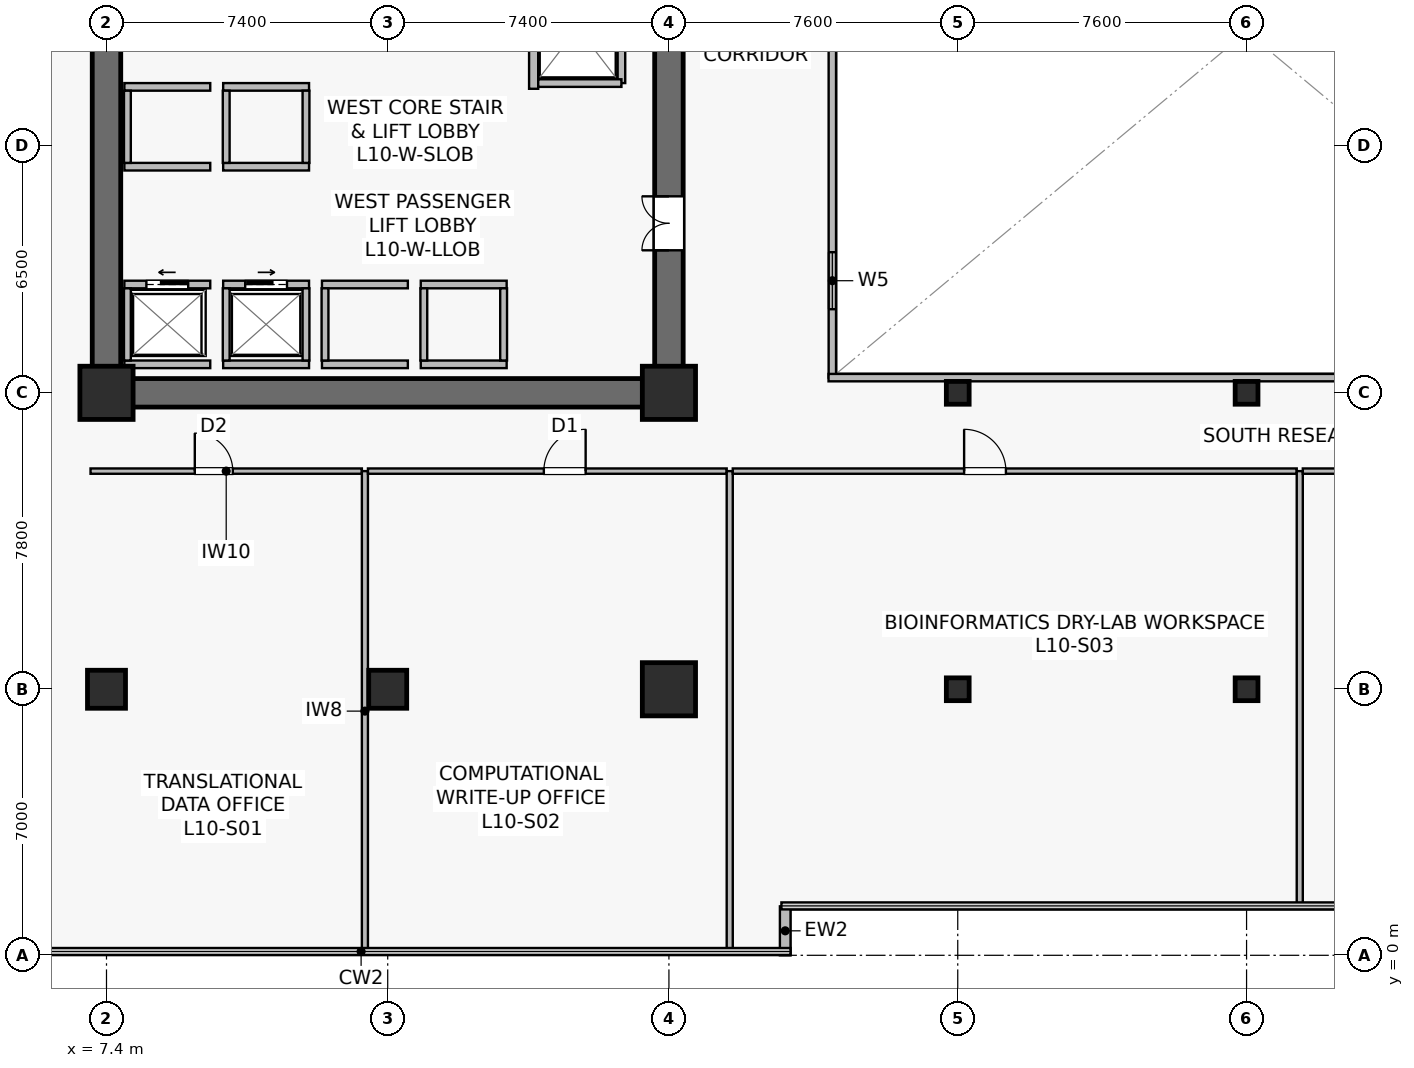
"""IFC4 building model, lengths in metres.
Left out: names, types, materials, properties, quantities, classifications, styles, units other than length and angle.
Written with IfcOpenShell. Run it as: python <this file> out.ifc"""

import sys

from ifc_helpers import new_model, si_unit, direction, frame, frame_2d, origin, origin_2d, place, context, subcontext, project, spatial, rectangle, hollow_rectangle, extrude, source, transform, mapped, element, fill, save


model = new_model("IFC4")
c1 = context("Model", 3, precision=1e-05, world=origin(), true_north=direction((0.0, 1.0)))
c2 = subcontext(c1, "Body", "Model", "MODEL_VIEW")
j1 = project(units=[si_unit("LENGTHUNIT", "METRE"), si_unit("PLANEANGLEUNIT", "RADIAN")], contexts=[c1])
p1 = place(None, origin())
s1 = spatial("IfcSite", under=j1, at=p1, CompositionType="ELEMENT")
p2 = place(p1, origin())
s2 = spatial("IfcBuilding", under=s1, at=p2, CompositionType="ELEMENT")
p3 = place(p2, frame((0.0, 0.0, 41.6)))
s3 = spatial("IfcBuildingStorey", under=s2, at=p3, CompositionType="ELEMENT", Elevation=41.6)
p4 = place(p3, frame((7.025, 14.8, 0.0), z_axis=(0.0, 0.0, 1.0), x_axis=(1.0, 0.0, 0.0)))
e1 = element("IfcWall", 1, at=p4, inside=s3, PredefinedType="SHEAR", context=c2, shape_type="SweptSolid", body=[
    extrude(rectangle(XDim=15.55, YDim=0.75, at=frame_2d((7.775, 0.0))), origin(), (0.0, 0.0, 1.0), 3.78),
])
p5 = place(p3, frame((7.4, 15.175, 0.0), z_axis=(0.0, 0.0, 1.0), x_axis=(0.0, 1.0, 0.0)))
e2 = element("IfcWall", 2, at=p5, inside=s3, PredefinedType="SHEAR", context=c2, shape_type="SweptSolid", body=[
    extrude(rectangle(XDim=18.25, YDim=0.75, at=frame_2d((9.125, 0.0))), origin(), (0.0, 0.0, 1.0), 3.78),
])
p6 = place(p3, frame((22.2, 15.175, 0.0), z_axis=(0.0, 0.0, 1.0), x_axis=(0.0, 1.0, 0.0)))
e3 = element("IfcWall", 3, at=p6, inside=s3, PredefinedType="SHEAR", context=c2, shape_type="SweptSolid", body=[
    extrude(rectangle(XDim=18.25, YDim=0.75, at=frame_2d((9.125, 0.0))), origin(), (0.0, 0.0, 1.0), 3.78),
])
p7 = place(p6, frame((3.375, 0.0, 0.0)))
e4 = element("IfcOpeningElement", 4, at=p7, cuts=e3, PredefinedType="OPENING", context=c2, shape_type="SweptSolid", body=[
    extrude(rectangle(XDim=1.42, YDim=2.2, at=frame_2d((0.71, 1.1))), frame((0.0, 0.385, 0.0), z_axis=(0.0, -1.0, 0.0), x_axis=(1.0, 0.0, 0.0)), (0.0, 0.0, 1.0), 0.77),
])
m1 = source(origin(), c2, "Body", "SweptSolid", [
    extrude(rectangle(XDim=1.0, YDim=1.0, at=origin_2d()), origin(), (0.0, 0.0, 1.0), 4.1),
])
p8 = place(p3, frame((14.8, 7.0, 0.0), z_axis=(0.0, 0.0, 1.0), x_axis=(1.0, 0.0, 0.0)))
e5 = element("IfcColumn", 5, at=p8, inside=s3, PredefinedType="COLUMN", context=c2, shape_type="MappedRepresentation", body=[
    mapped(m1, transform((0.0, 0.0, 0.0), scale=1.0)),
])
m2 = source(origin(), c2, "Body", "SweptSolid", [
    extrude(rectangle(XDim=1.4, YDim=1.4, at=origin_2d()), origin(), (0.0, 0.0, 1.0), 4.1),
])
for number, where, z_axis, x_axis in (
    (6, (22.2, 7.0, 0.0), (0.0, 0.0, 1.0), (1.0, 0.0, 0.0)),
    (7, (7.4, 14.8, 0.0), (0.0, 0.0, 1.0), (1.0, 0.0, 0.0)),
    (8, (22.2, 14.8, 0.0), (0.0, 0.0, 1.0), (1.0, 0.0, 0.0)),
):
    element("IfcColumn", number, at=place(p3, frame(where, z_axis=z_axis, x_axis=x_axis)), inside=s3, PredefinedType="COLUMN", context=c2, shape_type="MappedRepresentation", body=[
        mapped(m2, transform((0.0, 0.0, 0.0), scale=1.0)),
    ])
p9 = place(p3, frame((7.4, 7.0, 0.0), z_axis=(0.0, 0.0, 1.0), x_axis=(1.0, 0.0, 0.0)))
e9 = element("IfcColumn", 9, at=p9, inside=s3, PredefinedType="COLUMN", context=c2, shape_type="MappedRepresentation", body=[
    mapped(m1, transform((0.0, 0.0, 0.0), scale=1.0)),
])
m3 = source(origin(), c2, "Body", "SweptSolid", [
    extrude(hollow_rectangle(XDim=0.6, YDim=0.6, WallThickness=0.028, at=origin_2d()), origin(), (0.0, 0.0, 1.0), 4.1),
])
for number, where, z_axis, x_axis in (
    (10, (29.8, 7.0, 0.0), (0.0, 0.0, 1.0), (1.0, 0.0, 0.0)),
    (11, (29.8, 14.8, 0.0), (0.0, 0.0, 1.0), (1.0, 0.0, 0.0)),
    (12, (37.4, 7.0, 0.0), (0.0, 0.0, 1.0), (1.0, 0.0, 0.0)),
    (13, (37.4, 14.8, 0.0), (0.0, 0.0, 1.0), (1.0, 0.0, 0.0)),
):
    element("IfcColumn", number, at=place(p3, frame(where, z_axis=z_axis, x_axis=x_axis)), inside=s3, PredefinedType="COLUMN", context=c2, shape_type="MappedRepresentation", body=[
        mapped(m3, transform((0.0, 0.0, 0.0), scale=1.0)),
    ])
p10 = place(p3, frame((25.26, 0.0, 0.0), z_axis=(0.0, 0.0, 1.0), x_axis=(0.0, 1.0, 0.0)))
e14 = element("IfcWall", 14, at=p10, inside=s3, PredefinedType="STANDARD", context=c2, shape_type="SweptSolid", body=[
    extrude(rectangle(XDim=1.288, YDim=0.28, at=frame_2d((0.644, 0.0))), origin(), (0.0, 0.0, 1.0), 3.78),
])
p11 = place(p3, frame((18.64, 22.8, 0.0), z_axis=(0.0, 0.0, 1.0), x_axis=(0.0, 1.0, 0.0)))
e15 = element("IfcWall", 15, at=p11, inside=s3, PredefinedType="SOLIDWALL", context=c2, shape_type="SweptSolid", body=[
    extrude(rectangle(XDim=6.85, YDim=0.24, at=frame_2d((3.425, 0.0))), origin(), (0.0, 0.0, 1.0), 2.865),
])
p12 = place(p11, frame((4.85, 0.0, 0.0)))
e16 = element("IfcOpeningElement", 16, at=p12, cuts=e15, PredefinedType="OPENING", context=c2, shape_type="SweptSolid", body=[
    extrude(rectangle(XDim=1.1, YDim=2.22, at=frame_2d((0.55, 1.11))), frame((0.0, 0.13, 0.0), z_axis=(0.0, -1.0, 0.0), x_axis=(1.0, 0.0, 0.0)), (0.0, 0.0, 1.0), 0.26),
])
p13 = place(p11, frame((1.0, 0.0, 0.0)))
e17 = element("IfcOpeningElement", 17, at=p13, cuts=e15, PredefinedType="OPENING", context=c2, shape_type="SweptSolid", body=[
    extrude(rectangle(XDim=1.2, YDim=2.22, at=frame_2d((0.6, 1.11))), frame((0.0, 0.13, 0.0), z_axis=(0.0, -1.0, 0.0), x_axis=(1.0, 0.0, 0.0)), (0.0, 0.0, 1.0), 0.26),
])
p14 = place(p3, frame((7.87, 17.65, 0.0), z_axis=(0.0, 0.0, 1.0), x_axis=(1.0, 0.0, 0.0)))
e18 = element("IfcWall", 18, at=p14, inside=s3, PredefinedType="SOLIDWALL", context=c2, shape_type="SweptSolid", body=[
    extrude(rectangle(XDim=2.26, YDim=0.2, at=frame_2d((1.13, 0.0))), origin(), (0.0, 0.0, 1.0), 3.78),
])
p15 = place(p14, frame((0.58, 0.0, 0.0)))
e19 = element("IfcOpeningElement", 19, at=p15, cuts=e18, PredefinedType="OPENING", context=c2, shape_type="SweptSolid", body=[
    extrude(rectangle(XDim=1.1, YDim=2.22, at=frame_2d((0.55, 1.11))), frame((0.0, 0.11, 0.0), z_axis=(0.0, -1.0, 0.0), x_axis=(1.0, 0.0, 0.0)), (0.0, 0.0, 1.0), 0.22),
])
p16 = place(p3, frame((7.87, 15.55, 0.0), z_axis=(0.0, 0.0, 1.0), x_axis=(1.0, 0.0, 0.0)))
e20 = element("IfcWall", 20, at=p16, inside=s3, PredefinedType="SOLIDWALL", context=c2, shape_type="SweptSolid", body=[
    extrude(rectangle(XDim=2.26, YDim=0.2, at=frame_2d((1.13, 0.0))), origin(), (0.0, 0.0, 1.0), 3.78),
])
p17 = place(p3, frame((7.95, 15.65, 0.0), z_axis=(0.0, 0.0, 1.0), x_axis=(0.0, 1.0, 0.0)))
e21 = element("IfcWall", 21, at=p17, inside=s3, PredefinedType="SOLIDWALL", context=c2, shape_type="SweptSolid", body=[
    extrude(rectangle(XDim=1.9, YDim=0.18, at=frame_2d((0.95, 0.0))), origin(), (0.0, 0.0, 1.0), 3.78),
])
p18 = place(p3, frame((10.47, 17.65, 0.0), z_axis=(0.0, 0.0, 1.0), x_axis=(1.0, 0.0, 0.0)))
e22 = element("IfcWall", 22, at=p18, inside=s3, PredefinedType="SOLIDWALL", context=c2, shape_type="SweptSolid", body=[
    extrude(rectangle(XDim=2.26, YDim=0.2, at=frame_2d((1.13, 0.0))), origin(), (0.0, 0.0, 1.0), 3.78),
])
p19 = place(p18, frame((0.58, 0.0, 0.0)))
e23 = element("IfcOpeningElement", 23, at=p19, cuts=e22, PredefinedType="OPENING", context=c2, shape_type="SweptSolid", body=[
    extrude(rectangle(XDim=1.1, YDim=2.22, at=frame_2d((0.55, 1.11))), frame((0.0, 0.11, 0.0), z_axis=(0.0, -1.0, 0.0), x_axis=(1.0, 0.0, 0.0)), (0.0, 0.0, 1.0), 0.22),
])
p20 = place(p3, frame((10.47, 15.55, 0.0), z_axis=(0.0, 0.0, 1.0), x_axis=(1.0, 0.0, 0.0)))
e24 = element("IfcWall", 24, at=p20, inside=s3, PredefinedType="SOLIDWALL", context=c2, shape_type="SweptSolid", body=[
    extrude(rectangle(XDim=2.26, YDim=0.2, at=frame_2d((1.13, 0.0))), origin(), (0.0, 0.0, 1.0), 3.78),
])
for number, where, z_axis, x_axis in (
    (25, (10.55, 15.65, 0.0), (0.0, 0.0, 1.0), (0.0, 1.0, 0.0)),
    (26, (12.65, 15.65, 0.0), (0.0, 0.0, 1.0), (0.0, 1.0, 0.0)),
):
    element("IfcWall", number, at=place(p3, frame(where, z_axis=z_axis, x_axis=x_axis)), inside=s3, PredefinedType="SOLIDWALL", context=c2, shape_type="SweptSolid", body=[
        extrude(rectangle(XDim=1.9, YDim=0.18, at=frame_2d((0.95, 0.0))), origin(), (0.0, 0.0, 1.0), 3.78),
    ])
for number, where, z_axis, x_axis in (
    (27, (13.07, 17.65, 0.0), (0.0, 0.0, 1.0), (1.0, 0.0, 0.0)),
    (28, (13.07, 15.55, 0.0), (0.0, 0.0, 1.0), (1.0, 0.0, 0.0)),
):
    element("IfcWall", number, at=place(p3, frame(where, z_axis=z_axis, x_axis=x_axis)), inside=s3, PredefinedType="SOLIDWALL", context=c2, shape_type="SweptSolid", body=[
        extrude(rectangle(XDim=2.26, YDim=0.2, at=frame_2d((1.13, 0.0))), origin(), (0.0, 0.0, 1.0), 3.065),
    ])
p21 = place(p3, frame((13.15, 15.65, 0.0), z_axis=(0.0, 0.0, 1.0), x_axis=(0.0, 1.0, 0.0)))
e29 = element("IfcWall", 29, at=p21, inside=s3, PredefinedType="SOLIDWALL", context=c2, shape_type="SweptSolid", body=[
    extrude(rectangle(XDim=1.9, YDim=0.18, at=frame_2d((0.95, 0.0))), origin(), (0.0, 0.0, 1.0), 3.78),
])
for number, where, z_axis, x_axis in (
    (30, (15.67, 17.65, 0.0), (0.0, 0.0, 1.0), (1.0, 0.0, 0.0)),
    (31, (15.67, 15.55, 0.0), (0.0, 0.0, 1.0), (1.0, 0.0, 0.0)),
):
    element("IfcWall", number, at=place(p3, frame(where, z_axis=z_axis, x_axis=x_axis)), inside=s3, PredefinedType="SOLIDWALL", context=c2, shape_type="SweptSolid", body=[
        extrude(rectangle(XDim=2.26, YDim=0.2, at=frame_2d((1.13, 0.0))), origin(), (0.0, 0.0, 1.0), 3.78),
    ])
for number, where, z_axis, x_axis in (
    (32, (15.75, 15.65, 0.0), (0.0, 0.0, 1.0), (0.0, 1.0, 0.0)),
    (33, (17.85, 15.65, 0.0), (0.0, 0.0, 1.0), (0.0, 1.0, 0.0)),
):
    element("IfcWall", number, at=place(p3, frame(where, z_axis=z_axis, x_axis=x_axis)), inside=s3, PredefinedType="SOLIDWALL", context=c2, shape_type="SweptSolid", body=[
        extrude(rectangle(XDim=1.9, YDim=0.18, at=frame_2d((0.95, 0.0))), origin(), (0.0, 0.0, 1.0), 3.78),
    ])
for number, where, z_axis, x_axis in (
    (34, (7.87, 20.75, 0.0), (0.0, 0.0, 1.0), (1.0, 0.0, 0.0)),
    (35, (7.87, 22.85, 0.0), (0.0, 0.0, 1.0), (1.0, 0.0, 0.0)),
):
    element("IfcWall", number, at=place(p3, frame(where, z_axis=z_axis, x_axis=x_axis)), inside=s3, PredefinedType="SOLIDWALL", context=c2, shape_type="SweptSolid", body=[
        extrude(rectangle(XDim=2.26, YDim=0.2, at=frame_2d((1.13, 0.0))), origin(), (0.0, 0.0, 1.0), 3.78),
    ])
p22 = place(p3, frame((7.95, 20.85, 0.0), z_axis=(0.0, 0.0, 1.0), x_axis=(0.0, 1.0, 0.0)))
e36 = element("IfcWall", 36, at=p22, inside=s3, PredefinedType="SOLIDWALL", context=c2, shape_type="SweptSolid", body=[
    extrude(rectangle(XDim=1.9, YDim=0.18, at=frame_2d((0.95, 0.0))), origin(), (0.0, 0.0, 1.0), 3.78),
])
for number, where, z_axis, x_axis in (
    (37, (10.47, 20.75, 0.0), (0.0, 0.0, 1.0), (1.0, 0.0, 0.0)),
    (38, (10.47, 22.85, 0.0), (0.0, 0.0, 1.0), (1.0, 0.0, 0.0)),
):
    element("IfcWall", number, at=place(p3, frame(where, z_axis=z_axis, x_axis=x_axis)), inside=s3, PredefinedType="SOLIDWALL", context=c2, shape_type="SweptSolid", body=[
        extrude(rectangle(XDim=2.26, YDim=0.2, at=frame_2d((1.13, 0.0))), origin(), (0.0, 0.0, 1.0), 3.78),
    ])
for number, where, z_axis, x_axis in (
    (39, (10.55, 20.85, 0.0), (0.0, 0.0, 1.0), (0.0, 1.0, 0.0)),
    (40, (12.65, 20.85, 0.0), (0.0, 0.0, 1.0), (0.0, 1.0, 0.0)),
):
    element("IfcWall", number, at=place(p3, frame(where, z_axis=z_axis, x_axis=x_axis)), inside=s3, PredefinedType="SOLIDWALL", context=c2, shape_type="SweptSolid", body=[
        extrude(rectangle(XDim=1.9, YDim=0.18, at=frame_2d((0.95, 0.0))), origin(), (0.0, 0.0, 1.0), 3.78),
    ])
p23 = place(p3, frame((20.95, 22.95, 0.0), z_axis=(0.0, 0.0, 1.0), x_axis=(0.0, 1.0, 0.0)))
e41 = element("IfcWall", 41, at=p23, inside=s3, PredefinedType="SOLIDWALL", context=c2, shape_type="SweptSolid", body=[
    extrude(rectangle(XDim=2.9, YDim=0.2, at=frame_2d((1.45, 0.0))), origin(), (0.0, 0.0, 1.0), 2.865),
])
p24 = place(p3, frame((18.76, 22.95, 0.0), z_axis=(0.0, 0.0, 1.0), x_axis=(1.0, 0.0, 0.0)))
e42 = element("IfcWall", 42, at=p24, inside=s3, PredefinedType="SOLIDWALL", context=c2, shape_type="SweptSolid", body=[
    extrude(rectangle(XDim=2.19, YDim=0.2, at=frame_2d((1.095, 0.0))), origin(), (0.0, 0.0, 1.0), 3.78),
])
p25 = place(p3, frame((26.5, 15.2, 0.0), z_axis=(0.0, 0.0, 1.0), x_axis=(0.0, 1.0, 0.0)))
e43 = element("IfcWall", 43, at=p25, inside=s3, PredefinedType="SOLIDWALL", context=c2, shape_type="SweptSolid", body=[
    extrude(rectangle(XDim=18.2, YDim=0.195, at=frame_2d((9.1, 0.0))), origin(), (0.0, 0.0, 1.0), 3.78),
])
p26 = place(p25, frame((1.8, 0.0, 0.9)))
e44 = element("IfcOpeningElement", 44, at=p26, cuts=e43, PredefinedType="OPENING", context=c2, shape_type="SweptSolid", body=[
    extrude(rectangle(XDim=1.5, YDim=1.4, at=frame_2d((0.75, 0.7))), frame((0.0, 0.107, 0.0), z_axis=(0.0, -1.0, 0.0), x_axis=(1.0, 0.0, 0.0)), (0.0, 0.0, 1.0), 0.215),
])
p27 = place(p25, frame((13.2, 0.0, 0.9)))
e45 = element("IfcOpeningElement", 45, at=p27, cuts=e43, PredefinedType="OPENING", context=c2, shape_type="SweptSolid", body=[
    extrude(rectangle(XDim=1.5, YDim=1.4, at=frame_2d((0.75, 0.7))), frame((0.0, 0.107, 0.0), z_axis=(0.0, -1.0, 0.0), x_axis=(1.0, 0.0, 0.0)), (0.0, 0.0, 1.0), 0.215),
])
p28 = place(p3, frame((26.4, 15.2, 0.0), z_axis=(0.0, 0.0, 1.0), x_axis=(1.0, 0.0, 0.0)))
e46 = element("IfcWall", 46, at=p28, inside=s3, PredefinedType="SOLIDWALL", context=c2, shape_type="SweptSolid", body=[
    extrude(rectangle(XDim=22.0, YDim=0.195, at=frame_2d((11.0, 0.0))), origin(), (0.0, 0.0, 1.0), 3.78),
])
p29 = place(p3, frame((6.98, 12.74, 0.0), z_axis=(0.0, 0.0, 1.0), x_axis=(1.0, 0.0, 0.0)))
e47 = element("IfcWall", 47, at=p29, inside=s3, PredefinedType="PARTITIONING", context=c2, shape_type="SweptSolid", body=[
    extrude(rectangle(XDim=7.14, YDim=0.14, at=frame_2d((3.57, 0.0))), origin(), (0.0, 0.0, 1.0), 3.265),
])
p30 = place(p29, frame((2.744, 0.0, 0.0)))
e48 = element("IfcOpeningElement", 48, at=p30, cuts=e47, PredefinedType="OPENING", context=c2, shape_type="SweptSolid", body=[
    extrude(rectangle(XDim=1.0, YDim=2.15, at=frame_2d((0.5, 1.075))), frame((0.0, 0.08, 0.0), z_axis=(0.0, -1.0, 0.0), x_axis=(1.0, 0.0, 0.0)), (0.0, 0.0, 1.0), 0.16),
])
p31 = place(p3, frame((14.2, 0.11, 0.0), z_axis=(0.0, 0.0, 1.0), x_axis=(0.0, 1.0, 0.0)))
e49 = element("IfcWall", 49, at=p31, inside=s3, PredefinedType="PARTITIONING", context=c2, shape_type="SweptSolid", body=[
    extrude(rectangle(XDim=12.63, YDim=0.16, at=frame_2d((6.315, 0.0))), origin(), (0.0, 0.0, 1.0), 3.015),
])
p32 = place(p3, frame((14.28, 12.74, 0.0), z_axis=(0.0, 0.0, 1.0), x_axis=(1.0, 0.0, 0.0)))
e50 = element("IfcWall", 50, at=p32, inside=s3, PredefinedType="PARTITIONING", context=c2, shape_type="SweptSolid", body=[
    extrude(rectangle(XDim=9.44, YDim=0.14, at=frame_2d((4.72, 0.0))), origin(), (0.0, 0.0, 1.0), 3.065),
])
p33 = place(p32, frame((4.628, 0.0, 0.0)))
e51 = element("IfcOpeningElement", 51, at=p33, cuts=e50, PredefinedType="OPENING", context=c2, shape_type="SweptSolid", body=[
    extrude(rectangle(XDim=1.1, YDim=2.18, at=frame_2d((0.55, 1.09))), frame((0.0, 0.08, 0.0), z_axis=(0.0, -1.0, 0.0), x_axis=(1.0, 0.0, 0.0)), (0.0, 0.0, 1.0), 0.16),
])
p34 = place(p3, frame((23.8, 0.11, 0.0), z_axis=(0.0, 0.0, 1.0), x_axis=(0.0, 1.0, 0.0)))
e52 = element("IfcWall", 52, at=p34, inside=s3, PredefinedType="PARTITIONING", context=c2, shape_type="SweptSolid", body=[
    extrude(rectangle(XDim=12.63, YDim=0.16, at=frame_2d((6.315, 0.0))), origin(), (0.0, 0.0, 1.0), 3.015),
])
p35 = place(p3, frame((23.88, 12.74, 0.0), z_axis=(0.0, 0.0, 1.0), x_axis=(1.0, 0.0, 0.0)))
e53 = element("IfcWall", 53, at=p35, inside=s3, PredefinedType="PARTITIONING", context=c2, shape_type="SweptSolid", body=[
    extrude(rectangle(XDim=14.84, YDim=0.14, at=frame_2d((7.42, 0.0))), origin(), (0.0, 0.0, 1.0), 3.065),
])
p36 = place(p35, frame((6.088, 0.0, 0.0)))
e54 = element("IfcOpeningElement", 54, at=p36, cuts=e53, PredefinedType="OPENING", context=c2, shape_type="SweptSolid", body=[
    extrude(rectangle(XDim=1.1, YDim=2.18, at=frame_2d((0.55, 1.09))), frame((0.0, 0.08, 0.0), z_axis=(0.0, -1.0, 0.0), x_axis=(1.0, 0.0, 0.0)), (0.0, 0.0, 1.0), 0.16),
])
p37 = place(p3, frame((38.8, 1.31, 0.0), z_axis=(0.0, 0.0, 1.0), x_axis=(0.0, 1.0, 0.0)))
e55 = element("IfcWall", 55, at=p37, inside=s3, PredefinedType="PARTITIONING", context=c2, shape_type="SweptSolid", body=[
    extrude(rectangle(XDim=11.43, YDim=0.16, at=frame_2d((5.715, 0.0))), origin(), (0.0, 0.0, 1.0), 3.015),
])
p38 = place(p3, frame((38.88, 12.74, 0.0), z_axis=(0.0, 0.0, 1.0), x_axis=(1.0, 0.0, 0.0)))
e56 = element("IfcWall", 56, at=p38, inside=s3, PredefinedType="PARTITIONING", context=c2, shape_type="SweptSolid", body=[
    extrude(rectangle(XDim=16.44, YDim=0.14, at=frame_2d((8.22, 0.0))), origin(), (0.0, 0.0, 1.0), 3.065),
])
p39 = place(p38, frame((8.548, 0.0, 0.0)))
e57 = element("IfcOpeningElement", 57, at=p39, cuts=e56, PredefinedType="OPENING", context=c2, shape_type="SweptSolid", body=[
    extrude(rectangle(XDim=1.1, YDim=2.18, at=frame_2d((0.55, 1.09))), frame((0.0, 0.08, 0.0), z_axis=(0.0, -1.0, 0.0), x_axis=(1.0, 0.0, 0.0)), (0.0, 0.0, 1.0), 0.16),
])
m4 = source(origin(), c2, "Body", "SweptSolid", [
    extrude(rectangle(XDim=1.5, YDim=1.4, at=frame_2d((0.75, 0.7))), frame((0.0, 0.03, 0.0), z_axis=(0.0, -1.0, 0.0), x_axis=(1.0, 0.0, 0.0)), (0.0, 0.0, 1.0), 0.06),
])
p40 = place(p26, origin())
e58 = element("IfcWindow", 58, at=p40, inside=s3, PartitioningType="SINGLE_PANEL", PredefinedType="WINDOW", context=c2, shape_type="MappedRepresentation", body=[
    mapped(m4, transform((0.0, 0.0, 0.0), scale=1.0)),
])
fill(e44, e58)
m5 = source(origin(), c2, "Body", "SweptSolid", [
    extrude(rectangle(XDim=1.1, YDim=2.22, at=frame_2d((0.55, 1.11))), frame((0.0, 0.025, 0.0), z_axis=(0.0, -1.0, 0.0), x_axis=(1.0, 0.0, 0.0)), (0.0, 0.0, 1.0), 0.05),
])
p41 = place(p15, origin())
e59 = element("IfcDoor", 59, at=p41, inside=s3, OperationType="SLIDING_TO_LEFT", PredefinedType="USERDEFINED", context=c2, shape_type="MappedRepresentation", body=[
    mapped(m5, transform((0.0, 0.0, 0.0), scale=1.0)),
])
fill(e19, e59)
p42 = place(p19, origin())
e60 = element("IfcDoor", 60, at=p42, inside=s3, OperationType="SLIDING_TO_RIGHT", PredefinedType="USERDEFINED", context=c2, shape_type="MappedRepresentation", body=[
    mapped(m5, transform((0.0, 0.0, 0.0), scale=1.0)),
])
fill(e23, e60)
m6 = source(origin(), c2, "Body", "SweptSolid", [
    extrude(rectangle(XDim=1.42, YDim=2.2, at=frame_2d((0.71, 1.1))), frame((0.0, 0.025, 0.0), z_axis=(0.0, -1.0, 0.0), x_axis=(1.0, 0.0, 0.0)), (0.0, 0.0, 1.0), 0.05),
])
p43 = place(p7, origin())
e61 = element("IfcDoor", 61, at=p43, inside=s3, OperationType="DOUBLE_DOOR_SINGLE_SWING", PredefinedType="DOOR", context=c2, shape_type="MappedRepresentation", body=[
    mapped(m6, transform((0.0, 0.0, 0.0), scale=1.0)),
])
fill(e4, e61)
m7 = source(origin(), c2, "Body", "SweptSolid", [
    extrude(rectangle(XDim=1.0, YDim=2.15, at=frame_2d((0.5, 1.075))), frame((0.0, 0.025, 0.0), z_axis=(0.0, -1.0, 0.0), x_axis=(1.0, 0.0, 0.0)), (0.0, 0.0, 1.0), 0.05),
])
p44 = place(p30, origin())
e62 = element("IfcDoor", 62, at=p44, inside=s3, OperationType="SINGLE_SWING_LEFT", PredefinedType="DOOR", context=c2, shape_type="MappedRepresentation", body=[
    mapped(m7, transform((0.0, 0.0, 0.0), scale=1.0)),
])
fill(e48, e62)
m8 = source(origin(), c2, "Body", "SweptSolid", [
    extrude(rectangle(XDim=1.1, YDim=2.18, at=frame_2d((0.55, 1.09))), frame((0.0, 0.025, 0.0), z_axis=(0.0, -1.0, 0.0), x_axis=(1.0, 0.0, 0.0)), (0.0, 0.0, 1.0), 0.05),
])
p45 = place(p33, origin())
e63 = element("IfcDoor", 63, at=p45, inside=s3, OperationType="SINGLE_SWING_RIGHT", PredefinedType="DOOR", context=c2, shape_type="MappedRepresentation", body=[
    mapped(m8, transform((0.0, 0.0, 0.0), scale=1.0)),
])
fill(e51, e63)
p46 = place(p36, origin())
e64 = element("IfcDoor", 64, at=p46, inside=s3, OperationType="SINGLE_SWING_LEFT", PredefinedType="DOOR", context=c2, shape_type="MappedRepresentation", body=[
    mapped(m8, transform((0.0, 0.0, 0.0), scale=1.0)),
])
fill(e54, e64)
save(model, sys.argv[1])
